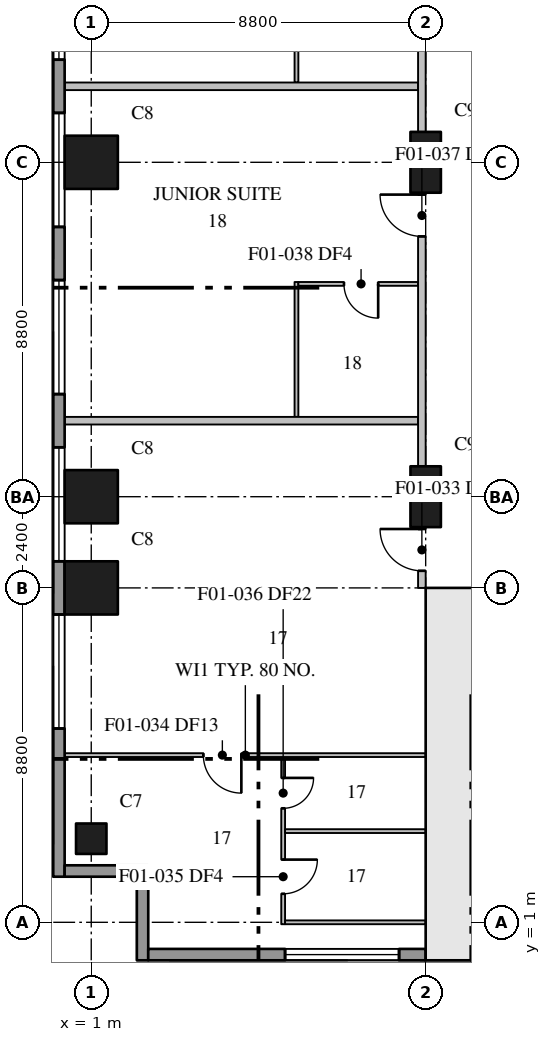
"""IFC4 building model, lengths in metres.
Left out: names, types, materials, properties, quantities, classifications, styles, units other than length and angle.
Written with IfcOpenShell. Run it as: python <this file> out.ifc"""

import sys

from ifc_helpers import new_model, si_unit, direction, frame, frame_2d, origin, origin_2d, place, context, subcontext, project, spatial, rectangle, extrude, element, fill, save


model = new_model("IFC4")
c1 = context("Model", 3, precision=1e-05, world=origin(), true_north=direction((0.0, 1.0)))
c2 = subcontext(c1, "Body", "Model", "MODEL_VIEW")
j1 = project(units=[si_unit("LENGTHUNIT", "METRE"), si_unit("PLANEANGLEUNIT", "RADIAN")], contexts=[c1])
p1 = place(None, origin())
s1 = spatial("IfcSite", under=j1, at=p1, CompositionType="ELEMENT")
p2 = place(p1, origin())
s2 = spatial("IfcBuilding", under=s1, at=p2, CompositionType="ELEMENT")
p3 = place(p2, frame((0.0, 0.0, 34.0)))
s3 = spatial("IfcBuildingStorey", under=s2, at=p3, CompositionType="ELEMENT", Elevation=34.0)
p4 = place(p3, frame((1.0, 3.2, 0.0), z_axis=(0.0, 0.0, 1.0), x_axis=(1.0, 0.0, 0.0)))
e1 = element("IfcColumn", 1, at=p4, inside=s3, PredefinedType="COLUMN", context=c2, shape_type="SweptSolid", body=[
    extrude(rectangle(XDim=0.8, YDim=0.8, at=origin_2d()), origin(), (0.0, 0.0, 1.0), 3.7),
])
for number, where, z_axis, x_axis in (
    (2, (1.0, 9.8, 0.0), (0.0, 0.0, 1.0), (1.0, 0.0, 0.0)),
    (3, (1.0, 12.2, 0.0), (0.0, 0.0, 1.0), (1.0, 0.0, 0.0)),
    (4, (1.0, 21.0, 0.0), (0.0, 0.0, 1.0), (1.0, 0.0, 0.0)),
):
    element("IfcColumn", number, at=place(p3, frame(where, z_axis=z_axis, x_axis=x_axis)), inside=s3, PredefinedType="COLUMN", context=c2, shape_type="SweptSolid", body=[
        extrude(rectangle(XDim=1.4, YDim=1.4, at=origin_2d()), origin(), (0.0, 0.0, 1.0), 3.7),
    ])
for number, where, z_axis, x_axis in (
    (5, (9.8, 12.2, 0.0), (0.0, 0.0, 1.0), (0.0, 1.0, 0.0)),
    (6, (9.8, 21.0, 0.0), (0.0, 0.0, 1.0), (0.0, 1.0, 0.0)),
):
    element("IfcColumn", number, at=place(p3, frame(where, z_axis=z_axis, x_axis=x_axis)), inside=s3, PredefinedType="COLUMN", context=c2, shape_type="SweptSolid", body=[
        extrude(rectangle(XDim=1.6, YDim=0.8, at=origin_2d()), origin(), (0.0, 0.0, 1.0), 3.7),
    ])
p5 = place(p3, frame((9.8, 0.7, 0.0), z_axis=(0.0, 0.0, 1.0), x_axis=(1.0, 0.0, 0.0)))
e7 = element("IfcWall", 7, at=p5, inside=s3, PredefinedType="SHEAR", context=c2, shape_type="SweptSolid", body=[
    extrude(rectangle(XDim=35.2, YDim=1.0, at=frame_2d((17.6, 0.0))), origin(), (0.0, 0.0, 1.0), 3.7),
])
p6 = place(p3, frame((10.5, 1.2, 0.0), z_axis=(0.0, 0.0, 1.0), x_axis=(0.0, 1.0, 0.0)))
e8 = element("IfcWall", 8, at=p6, inside=s3, PredefinedType="SHEAR", context=c2, shape_type="SweptSolid", body=[
    extrude(rectangle(XDim=8.6, YDim=1.0, at=frame_2d((4.3, 0.0))), origin(), (0.0, 0.0, 1.0), 3.7),
])
p7 = place(p3, frame((9.8, 9.6, 0.0), z_axis=(0.0, 0.0, 1.0), x_axis=(1.0, 0.0, 0.0)))
e9 = element("IfcWall", 9, at=p7, inside=s3, PredefinedType="SHEAR", context=c2, shape_type="SweptSolid", body=[
    extrude(rectangle(XDim=4.3, YDim=0.4, at=frame_2d((2.15, 0.0))), origin(), (0.0, 0.0, 1.0), 3.7),
])
p8 = place(p7, frame((2.05, 0.0, 0.0)))
e10 = element("IfcOpeningElement", 10, at=p8, cuts=e9, PredefinedType="OPENING", context=c2, shape_type="SweptSolid", body=[
    extrude(rectangle(XDim=1.2, YDim=2.1, at=frame_2d((0.6, 1.05))), frame((0.0, 0.21, 0.0), z_axis=(0.0, -1.0, 0.0), x_axis=(1.0, 0.0, 0.0)), (0.0, 0.0, 1.0), 0.42),
])
p9 = place(p3, frame((2.35, 2.2, 0.0), z_axis=(0.0, 0.0, 1.0), x_axis=(0.0, -1.0, 0.0)))
e11 = element("IfcWall", 11, at=p9, inside=s3, PredefinedType="STANDARD", context=c2, shape_type="SweptSolid", body=[
    extrude(rectangle(XDim=2.2, YDim=0.3, at=frame_2d((1.1, 0.0))), origin(), (0.0, 0.0, 1.0), 3.4),
])
p10 = place(p3, frame((2.5, 0.15, 0.0), z_axis=(0.0, 0.0, 1.0), x_axis=(1.0, 0.0, 0.0)))
e12 = element("IfcWall", 12, at=p10, inside=s3, PredefinedType="STANDARD", context=c2, shape_type="SweptSolid", body=[
    extrude(rectangle(XDim=7.3, YDim=0.3, at=frame_2d((3.65, 0.0))), origin(), (0.0, 0.0, 1.0), 3.4),
])
p11 = place(p10, frame((3.6, 0.0, 0.75)))
e13 = element("IfcOpeningElement", 13, at=p11, cuts=e12, PredefinedType="OPENING", context=c2, shape_type="SweptSolid", body=[
    extrude(rectangle(XDim=3.0, YDim=2.3, at=frame_2d((1.5, 1.15))), frame((0.0, 0.16, 0.0), z_axis=(0.0, -1.0, 0.0), x_axis=(1.0, 0.0, 0.0)), (0.0, 0.0, 1.0), 0.32),
])
p12 = place(p3, frame((0.15, 78.7, 0.0), z_axis=(0.0, 0.0, 1.0), x_axis=(0.0, -1.0, 0.0)))
e14 = element("IfcWall", 14, at=p12, inside=s3, PredefinedType="STANDARD", context=c2, shape_type="SweptSolid", body=[
    extrude(rectangle(XDim=76.5, YDim=0.3, at=frame_2d((38.25, 0.0))), origin(), (0.0, 0.0, 1.0), 3.4),
])
p13 = place(p12, frame((3.6, 0.0, 0.75)))
e15 = element("IfcOpeningElement", 15, at=p13, cuts=e14, PredefinedType="OPENING", context=c2, shape_type="SweptSolid", body=[
    extrude(rectangle(XDim=3.0, YDim=2.3, at=frame_2d((1.5, 1.15))), frame((0.0, 0.16, 0.0), z_axis=(0.0, -1.0, 0.0), x_axis=(1.0, 0.0, 0.0)), (0.0, 0.0, 1.0), 0.32),
])
p14 = place(p12, frame((8.0, 0.0, 0.75)))
e16 = element("IfcOpeningElement", 16, at=p14, cuts=e14, PredefinedType="OPENING", context=c2, shape_type="SweptSolid", body=[
    extrude(rectangle(XDim=3.0, YDim=2.3, at=frame_2d((1.5, 1.15))), frame((0.0, 0.16, 0.0), z_axis=(0.0, -1.0, 0.0), x_axis=(1.0, 0.0, 0.0)), (0.0, 0.0, 1.0), 0.32),
])
p15 = place(p12, frame((12.4, 0.0, 0.75)))
e17 = element("IfcOpeningElement", 17, at=p15, cuts=e14, PredefinedType="OPENING", context=c2, shape_type="SweptSolid", body=[
    extrude(rectangle(XDim=3.0, YDim=2.3, at=frame_2d((1.5, 1.15))), frame((0.0, 0.16, 0.0), z_axis=(0.0, -1.0, 0.0), x_axis=(1.0, 0.0, 0.0)), (0.0, 0.0, 1.0), 0.32),
])
p16 = place(p12, frame((16.8, 0.0, 0.75)))
e18 = element("IfcOpeningElement", 18, at=p16, cuts=e14, PredefinedType="OPENING", context=c2, shape_type="SweptSolid", body=[
    extrude(rectangle(XDim=3.0, YDim=2.3, at=frame_2d((1.5, 1.15))), frame((0.0, 0.16, 0.0), z_axis=(0.0, -1.0, 0.0), x_axis=(1.0, 0.0, 0.0)), (0.0, 0.0, 1.0), 0.32),
])
p17 = place(p12, frame((21.2, 0.0, 0.75)))
e19 = element("IfcOpeningElement", 19, at=p17, cuts=e14, PredefinedType="OPENING", context=c2, shape_type="SweptSolid", body=[
    extrude(rectangle(XDim=3.0, YDim=2.3, at=frame_2d((1.5, 1.15))), frame((0.0, 0.16, 0.0), z_axis=(0.0, -1.0, 0.0), x_axis=(1.0, 0.0, 0.0)), (0.0, 0.0, 1.0), 0.32),
])
p18 = place(p12, frame((25.6, 0.0, 0.75)))
e20 = element("IfcOpeningElement", 20, at=p18, cuts=e14, PredefinedType="OPENING", context=c2, shape_type="SweptSolid", body=[
    extrude(rectangle(XDim=3.0, YDim=2.3, at=frame_2d((1.5, 1.15))), frame((0.0, 0.16, 0.0), z_axis=(0.0, -1.0, 0.0), x_axis=(1.0, 0.0, 0.0)), (0.0, 0.0, 1.0), 0.32),
])
p19 = place(p12, frame((30.0, 0.0, 0.75)))
e21 = element("IfcOpeningElement", 21, at=p19, cuts=e14, PredefinedType="OPENING", context=c2, shape_type="SweptSolid", body=[
    extrude(rectangle(XDim=3.0, YDim=2.3, at=frame_2d((1.5, 1.15))), frame((0.0, 0.16, 0.0), z_axis=(0.0, -1.0, 0.0), x_axis=(1.0, 0.0, 0.0)), (0.0, 0.0, 1.0), 0.32),
])
p20 = place(p12, frame((34.4, 0.0, 0.75)))
e22 = element("IfcOpeningElement", 22, at=p20, cuts=e14, PredefinedType="OPENING", context=c2, shape_type="SweptSolid", body=[
    extrude(rectangle(XDim=3.0, YDim=2.3, at=frame_2d((1.5, 1.15))), frame((0.0, 0.16, 0.0), z_axis=(0.0, -1.0, 0.0), x_axis=(1.0, 0.0, 0.0)), (0.0, 0.0, 1.0), 0.32),
])
p21 = place(p12, frame((38.8, 0.0, 0.75)))
e23 = element("IfcOpeningElement", 23, at=p21, cuts=e14, PredefinedType="OPENING", context=c2, shape_type="SweptSolid", body=[
    extrude(rectangle(XDim=3.0, YDim=2.3, at=frame_2d((1.5, 1.15))), frame((0.0, 0.16, 0.0), z_axis=(0.0, -1.0, 0.0), x_axis=(1.0, 0.0, 0.0)), (0.0, 0.0, 1.0), 0.32),
])
p22 = place(p12, frame((43.2, 0.0, 0.75)))
e24 = element("IfcOpeningElement", 24, at=p22, cuts=e14, PredefinedType="OPENING", context=c2, shape_type="SweptSolid", body=[
    extrude(rectangle(XDim=3.0, YDim=2.3, at=frame_2d((1.5, 1.15))), frame((0.0, 0.16, 0.0), z_axis=(0.0, -1.0, 0.0), x_axis=(1.0, 0.0, 0.0)), (0.0, 0.0, 1.0), 0.32),
])
p23 = place(p12, frame((47.6, 0.0, 0.75)))
e25 = element("IfcOpeningElement", 25, at=p23, cuts=e14, PredefinedType="OPENING", context=c2, shape_type="SweptSolid", body=[
    extrude(rectangle(XDim=3.0, YDim=2.3, at=frame_2d((1.5, 1.15))), frame((0.0, 0.16, 0.0), z_axis=(0.0, -1.0, 0.0), x_axis=(1.0, 0.0, 0.0)), (0.0, 0.0, 1.0), 0.32),
])
p24 = place(p12, frame((52.0, 0.0, 0.75)))
e26 = element("IfcOpeningElement", 26, at=p24, cuts=e14, PredefinedType="OPENING", context=c2, shape_type="SweptSolid", body=[
    extrude(rectangle(XDim=3.0, YDim=2.3, at=frame_2d((1.5, 1.15))), frame((0.0, 0.16, 0.0), z_axis=(0.0, -1.0, 0.0), x_axis=(1.0, 0.0, 0.0)), (0.0, 0.0, 1.0), 0.32),
])
p25 = place(p12, frame((56.4, 0.0, 0.75)))
e27 = element("IfcOpeningElement", 27, at=p25, cuts=e14, PredefinedType="OPENING", context=c2, shape_type="SweptSolid", body=[
    extrude(rectangle(XDim=3.0, YDim=2.3, at=frame_2d((1.5, 1.15))), frame((0.0, 0.16, 0.0), z_axis=(0.0, -1.0, 0.0), x_axis=(1.0, 0.0, 0.0)), (0.0, 0.0, 1.0), 0.32),
])
p26 = place(p12, frame((60.8, 0.0, 0.75)))
e28 = element("IfcOpeningElement", 28, at=p26, cuts=e14, PredefinedType="OPENING", context=c2, shape_type="SweptSolid", body=[
    extrude(rectangle(XDim=3.0, YDim=2.3, at=frame_2d((1.5, 1.15))), frame((0.0, 0.16, 0.0), z_axis=(0.0, -1.0, 0.0), x_axis=(1.0, 0.0, 0.0)), (0.0, 0.0, 1.0), 0.32),
])
p27 = place(p12, frame((65.2, 0.0, 0.75)))
e29 = element("IfcOpeningElement", 29, at=p27, cuts=e14, PredefinedType="OPENING", context=c2, shape_type="SweptSolid", body=[
    extrude(rectangle(XDim=3.0, YDim=2.3, at=frame_2d((1.5, 1.15))), frame((0.0, 0.16, 0.0), z_axis=(0.0, -1.0, 0.0), x_axis=(1.0, 0.0, 0.0)), (0.0, 0.0, 1.0), 0.32),
])
p28 = place(p12, frame((69.6, 0.0, 0.75)))
e30 = element("IfcOpeningElement", 30, at=p28, cuts=e14, PredefinedType="OPENING", context=c2, shape_type="SweptSolid", body=[
    extrude(rectangle(XDim=3.0, YDim=2.3, at=frame_2d((1.5, 1.15))), frame((0.0, 0.16, 0.0), z_axis=(0.0, -1.0, 0.0), x_axis=(1.0, 0.0, 0.0)), (0.0, 0.0, 1.0), 0.32),
])
p29 = place(p3, frame((0.3, 2.35, 0.0), z_axis=(0.0, 0.0, 1.0), x_axis=(1.0, 0.0, 0.0)))
e31 = element("IfcWall", 31, at=p29, inside=s3, PredefinedType="STANDARD", context=c2, shape_type="SweptSolid", body=[
    extrude(rectangle(XDim=2.2, YDim=0.3, at=frame_2d((1.1, 0.0))), origin(), (0.0, 0.0, 1.0), 3.4),
])
p30 = place(p3, frame((9.7, 9.8, 0.0), z_axis=(0.0, 0.0, 1.0), x_axis=(0.0, 1.0, 0.0)))
e32 = element("IfcWall", 32, at=p30, inside=s3, PredefinedType="PARTITIONING", context=c2, shape_type="SweptSolid", body=[
    extrude(rectangle(XDim=1.6, YDim=0.2, at=frame_2d((0.8, 0.0))), origin(), (0.0, 0.0, 1.0), 3.4),
])
p31 = place(p30, frame((0.45, 0.0, 0.0)))
e33 = element("IfcOpeningElement", 33, at=p31, cuts=e32, PredefinedType="OPENING", context=c2, shape_type="SweptSolid", body=[
    extrude(rectangle(XDim=1.1, YDim=2.1, at=frame_2d((0.55, 1.05))), frame((0.0, 0.11, 0.0), z_axis=(0.0, -1.0, 0.0), x_axis=(1.0, 0.0, 0.0)), (0.0, 0.0, 1.0), 0.22),
])
p32 = place(p3, frame((9.7, 13.0, 0.0), z_axis=(0.0, 0.0, 1.0), x_axis=(0.0, 1.0, 0.0)))
e34 = element("IfcWall", 34, at=p32, inside=s3, PredefinedType="PARTITIONING", context=c2, shape_type="SweptSolid", body=[
    extrude(rectangle(XDim=7.2, YDim=0.2, at=frame_2d((3.6, 0.0))), origin(), (0.0, 0.0, 1.0), 3.4),
])
p33 = place(p32, frame((6.05, 0.0, 0.0)))
e35 = element("IfcOpeningElement", 35, at=p33, cuts=e34, PredefinedType="OPENING", context=c2, shape_type="SweptSolid", body=[
    extrude(rectangle(XDim=1.1, YDim=2.1, at=frame_2d((0.55, 1.05))), frame((0.0, 0.11, 0.0), z_axis=(0.0, -1.0, 0.0), x_axis=(1.0, 0.0, 0.0)), (0.0, 0.0, 1.0), 0.22),
])
p34 = place(p3, frame((9.7, 21.8, 0.0), z_axis=(0.0, 0.0, 1.0), x_axis=(0.0, 1.0, 0.0)))
e36 = element("IfcWall", 36, at=p34, inside=s3, PredefinedType="PARTITIONING", context=c2, shape_type="SweptSolid", body=[
    extrude(rectangle(XDim=4.8, YDim=0.2, at=frame_2d((2.4, 0.0))), origin(), (0.0, 0.0, 1.0), 3.4),
])
for number, where, z_axis, x_axis in (
    (37, (0.31, 14.2, 0.0), (0.0, 0.0, 1.0), (1.0, 0.0, 0.0)),
    (38, (0.31, 23.0, 0.0), (0.0, 0.0, 1.0), (1.0, 0.0, 0.0)),
):
    element("IfcWall", number, at=place(p3, frame(where, z_axis=z_axis, x_axis=x_axis)), inside=s3, PredefinedType="PARTITIONING", context=c2, shape_type="SweptSolid", body=[
        extrude(rectangle(XDim=9.29, YDim=0.2, at=frame_2d((4.645, 0.0))), origin(), (0.0, 0.0, 1.0), 3.4),
    ])
p35 = place(p3, frame((6.05, 5.35, 0.0), z_axis=(0.0, 0.0, 1.0), x_axis=(0.0, -1.0, 0.0)))
e39 = element("IfcWall", 39, at=p35, inside=s3, PredefinedType="PARTITIONING", context=c2, shape_type="SweptSolid", body=[
    extrude(rectangle(XDim=4.4, YDim=0.1, at=frame_2d((2.2, 0.0))), origin(), (0.0, 0.0, 1.0), 3.4),
])
p36 = place(p35, frame((2.7, 0.0, 0.0)))
e40 = element("IfcOpeningElement", 40, at=p36, cuts=e39, PredefinedType="OPENING", context=c2, shape_type="SweptSolid", body=[
    extrude(rectangle(XDim=0.9, YDim=2.1, at=frame_2d((0.45, 1.05))), frame((0.0, 0.06, 0.0), z_axis=(0.0, -1.0, 0.0), x_axis=(1.0, 0.0, 0.0)), (0.0, 0.0, 1.0), 0.12),
])
p37 = place(p35, frame((0.55, 0.0, 0.0)))
e41 = element("IfcOpeningElement", 41, at=p37, cuts=e39, PredefinedType="OPENING", context=c2, shape_type="SweptSolid", body=[
    extrude(rectangle(XDim=0.8, YDim=2.1, at=frame_2d((0.4, 1.05))), frame((0.0, 0.06, 0.0), z_axis=(0.0, -1.0, 0.0), x_axis=(1.0, 0.0, 0.0)), (0.0, 0.0, 1.0), 0.12),
])
p38 = place(p3, frame((9.8, 5.4, 0.0), z_axis=(0.0, 0.0, 1.0), x_axis=(-1.0, 0.0, 0.0)))
e42 = element("IfcWall", 42, at=p38, inside=s3, PredefinedType="PARTITIONING", context=c2, shape_type="SweptSolid", body=[
    extrude(rectangle(XDim=9.49, YDim=0.1, at=frame_2d((4.745, 0.0))), origin(), (0.0, 0.0, 1.0), 3.4),
])
p39 = place(p38, frame((4.85, 0.0, 0.0)))
e43 = element("IfcOpeningElement", 43, at=p39, cuts=e42, PredefinedType="OPENING", context=c2, shape_type="SweptSolid", body=[
    extrude(rectangle(XDim=1.0, YDim=2.1, at=frame_2d((0.5, 1.05))), frame((0.0, 0.06, 0.0), z_axis=(0.0, -1.0, 0.0), x_axis=(1.0, 0.0, 0.0)), (0.0, 0.0, 1.0), 0.12),
])
for number, where, z_axis, x_axis in (
    (44, (6.1, 1.0, 0.0), (0.0, 0.0, 1.0), (1.0, 0.0, 0.0)),
    (45, (6.1, 3.4, 0.0), (0.0, 0.0, 1.0), (1.0, 0.0, 0.0)),
):
    element("IfcWall", number, at=place(p3, frame(where, z_axis=z_axis, x_axis=x_axis)), inside=s3, PredefinedType="PARTITIONING", context=c2, shape_type="SweptSolid", body=[
        extrude(rectangle(XDim=3.7, YDim=0.1, at=frame_2d((1.85, 0.0))), origin(), (0.0, 0.0, 1.0), 3.4),
    ])
p40 = place(p3, frame((6.4, 14.3, 0.0), z_axis=(0.0, 0.0, 1.0), x_axis=(0.0, 1.0, 0.0)))
e46 = element("IfcWall", 46, at=p40, inside=s3, PredefinedType="PARTITIONING", context=c2, shape_type="SweptSolid", body=[
    extrude(rectangle(XDim=3.55, YDim=0.1, at=frame_2d((1.775, 0.0))), origin(), (0.0, 0.0, 1.0), 3.4),
])
p41 = place(p3, frame((6.4, 23.1, 0.0), z_axis=(0.0, 0.0, 1.0), x_axis=(0.0, 1.0, 0.0)))
e47 = element("IfcWall", 47, at=p41, inside=s3, PredefinedType="PARTITIONING", context=c2, shape_type="SweptSolid", body=[
    extrude(rectangle(XDim=3.55, YDim=0.1, at=frame_2d((1.775, 0.0))), origin(), (0.0, 0.0, 1.0), 3.4),
])
p42 = place(p3, frame((9.6, 17.8, 0.0), z_axis=(0.0, 0.0, 1.0), x_axis=(-1.0, 0.0, 0.0)))
e48 = element("IfcWall", 48, at=p42, inside=s3, PredefinedType="PARTITIONING", context=c2, shape_type="SweptSolid", body=[
    extrude(rectangle(XDim=3.15, YDim=0.1, at=frame_2d((1.575, 0.0))), origin(), (0.0, 0.0, 1.0), 3.4),
])
p43 = place(p42, frame((1.05, 0.0, 0.0)))
e49 = element("IfcOpeningElement", 49, at=p43, cuts=e48, PredefinedType="OPENING", context=c2, shape_type="SweptSolid", body=[
    extrude(rectangle(XDim=0.9, YDim=2.1, at=frame_2d((0.45, 1.05))), frame((0.0, 0.06, 0.0), z_axis=(0.0, -1.0, 0.0), x_axis=(1.0, 0.0, 0.0)), (0.0, 0.0, 1.0), 0.12),
])
p44 = place(p11, origin())
e50 = element("IfcWindow", 50, at=p44, inside=s3, PartitioningType="SINGLE_PANEL", PredefinedType="WINDOW", context=c2, shape_type="SweptSolid", body=[
    extrude(rectangle(XDim=3.0, YDim=2.3, at=frame_2d((1.5, 1.15))), frame((0.0, 0.03, 0.0), z_axis=(0.0, -1.0, 0.0), x_axis=(1.0, 0.0, 0.0)), (0.0, 0.0, 1.0), 0.06),
])
fill(e13, e50)
p45 = place(p24, origin())
e51 = element("IfcWindow", 51, at=p45, inside=s3, PartitioningType="SINGLE_PANEL", PredefinedType="WINDOW", context=c2, shape_type="SweptSolid", body=[
    extrude(rectangle(XDim=3.0, YDim=2.3, at=frame_2d((1.5, 1.15))), frame((0.0, 0.03, 0.0), z_axis=(0.0, -1.0, 0.0), x_axis=(1.0, 0.0, 0.0)), (0.0, 0.0, 1.0), 0.06),
])
fill(e26, e51)
p46 = place(p25, origin())
e52 = element("IfcWindow", 52, at=p46, inside=s3, PartitioningType="SINGLE_PANEL", PredefinedType="WINDOW", context=c2, shape_type="SweptSolid", body=[
    extrude(rectangle(XDim=3.0, YDim=2.3, at=frame_2d((1.5, 1.15))), frame((0.0, 0.03, 0.0), z_axis=(0.0, -1.0, 0.0), x_axis=(1.0, 0.0, 0.0)), (0.0, 0.0, 1.0), 0.06),
])
fill(e27, e52)
p47 = place(p26, origin())
e53 = element("IfcWindow", 53, at=p47, inside=s3, PartitioningType="SINGLE_PANEL", PredefinedType="WINDOW", context=c2, shape_type="SweptSolid", body=[
    extrude(rectangle(XDim=3.0, YDim=2.3, at=frame_2d((1.5, 1.15))), frame((0.0, 0.03, 0.0), z_axis=(0.0, -1.0, 0.0), x_axis=(1.0, 0.0, 0.0)), (0.0, 0.0, 1.0), 0.06),
])
fill(e28, e53)
p48 = place(p27, origin())
e54 = element("IfcWindow", 54, at=p48, inside=s3, PartitioningType="SINGLE_PANEL", PredefinedType="WINDOW", context=c2, shape_type="SweptSolid", body=[
    extrude(rectangle(XDim=3.0, YDim=2.3, at=frame_2d((1.5, 1.15))), frame((0.0, 0.03, 0.0), z_axis=(0.0, -1.0, 0.0), x_axis=(1.0, 0.0, 0.0)), (0.0, 0.0, 1.0), 0.06),
])
fill(e29, e54)
p49 = place(p28, origin())
e55 = element("IfcWindow", 55, at=p49, inside=s3, PartitioningType="SINGLE_PANEL", PredefinedType="WINDOW", context=c2, shape_type="SweptSolid", body=[
    extrude(rectangle(XDim=3.0, YDim=2.3, at=frame_2d((1.5, 1.15))), frame((0.0, 0.03, 0.0), z_axis=(0.0, -1.0, 0.0), x_axis=(1.0, 0.0, 0.0)), (0.0, 0.0, 1.0), 0.06),
])
fill(e30, e55)
p50 = place(p31, origin())
e56 = element("IfcDoor", 56, at=p50, inside=s3, OperationType="SINGLE_SWING_RIGHT", PredefinedType="DOOR", context=c2, shape_type="SweptSolid", body=[
    extrude(rectangle(XDim=1.1, YDim=2.1, at=frame_2d((0.55, 1.05))), frame((0.0, 0.025, 0.0), z_axis=(0.0, -1.0, 0.0), x_axis=(1.0, 0.0, 0.0)), (0.0, 0.0, 1.0), 0.05),
])
fill(e33, e56)
p51 = place(p39, origin())
e57 = element("IfcDoor", 57, at=p51, inside=s3, OperationType="SINGLE_SWING_LEFT", PredefinedType="DOOR", context=c2, shape_type="SweptSolid", body=[
    extrude(rectangle(XDim=1.0, YDim=2.1, at=frame_2d((0.5, 1.05))), frame((0.0, 0.025, 0.0), z_axis=(0.0, -1.0, 0.0), x_axis=(1.0, 0.0, 0.0)), (0.0, 0.0, 1.0), 0.05),
])
fill(e43, e57)
p52 = place(p36, origin())
e58 = element("IfcDoor", 58, at=p52, inside=s3, OperationType="SINGLE_SWING_LEFT", PredefinedType="DOOR", context=c2, shape_type="SweptSolid", body=[
    extrude(rectangle(XDim=0.9, YDim=2.1, at=frame_2d((0.45, 1.05))), frame((0.0, 0.025, 0.0), z_axis=(0.0, -1.0, 0.0), x_axis=(1.0, 0.0, 0.0)), (0.0, 0.0, 1.0), 0.05),
])
fill(e40, e58)
p53 = place(p37, origin())
e59 = element("IfcDoor", 59, at=p53, inside=s3, OperationType="SINGLE_SWING_LEFT", PredefinedType="DOOR", context=c2, shape_type="SweptSolid", body=[
    extrude(rectangle(XDim=0.8, YDim=2.1, at=frame_2d((0.4, 1.05))), frame((0.0, 0.025, 0.0), z_axis=(0.0, -1.0, 0.0), x_axis=(1.0, 0.0, 0.0)), (0.0, 0.0, 1.0), 0.05),
])
fill(e41, e59)
p54 = place(p33, origin())
e60 = element("IfcDoor", 60, at=p54, inside=s3, OperationType="SINGLE_SWING_RIGHT", PredefinedType="DOOR", context=c2, shape_type="SweptSolid", body=[
    extrude(rectangle(XDim=1.1, YDim=2.1, at=frame_2d((0.55, 1.05))), frame((0.0, 0.025, 0.0), z_axis=(0.0, -1.0, 0.0), x_axis=(1.0, 0.0, 0.0)), (0.0, 0.0, 1.0), 0.05),
])
fill(e35, e60)
p55 = place(p43, origin())
e61 = element("IfcDoor", 61, at=p55, inside=s3, OperationType="SINGLE_SWING_LEFT", PredefinedType="DOOR", context=c2, shape_type="SweptSolid", body=[
    extrude(rectangle(XDim=0.9, YDim=2.1, at=frame_2d((0.45, 1.05))), frame((0.0, 0.025, 0.0), z_axis=(0.0, -1.0, 0.0), x_axis=(1.0, 0.0, 0.0)), (0.0, 0.0, 1.0), 0.05),
])
fill(e49, e61)
save(model, sys.argv[1])
